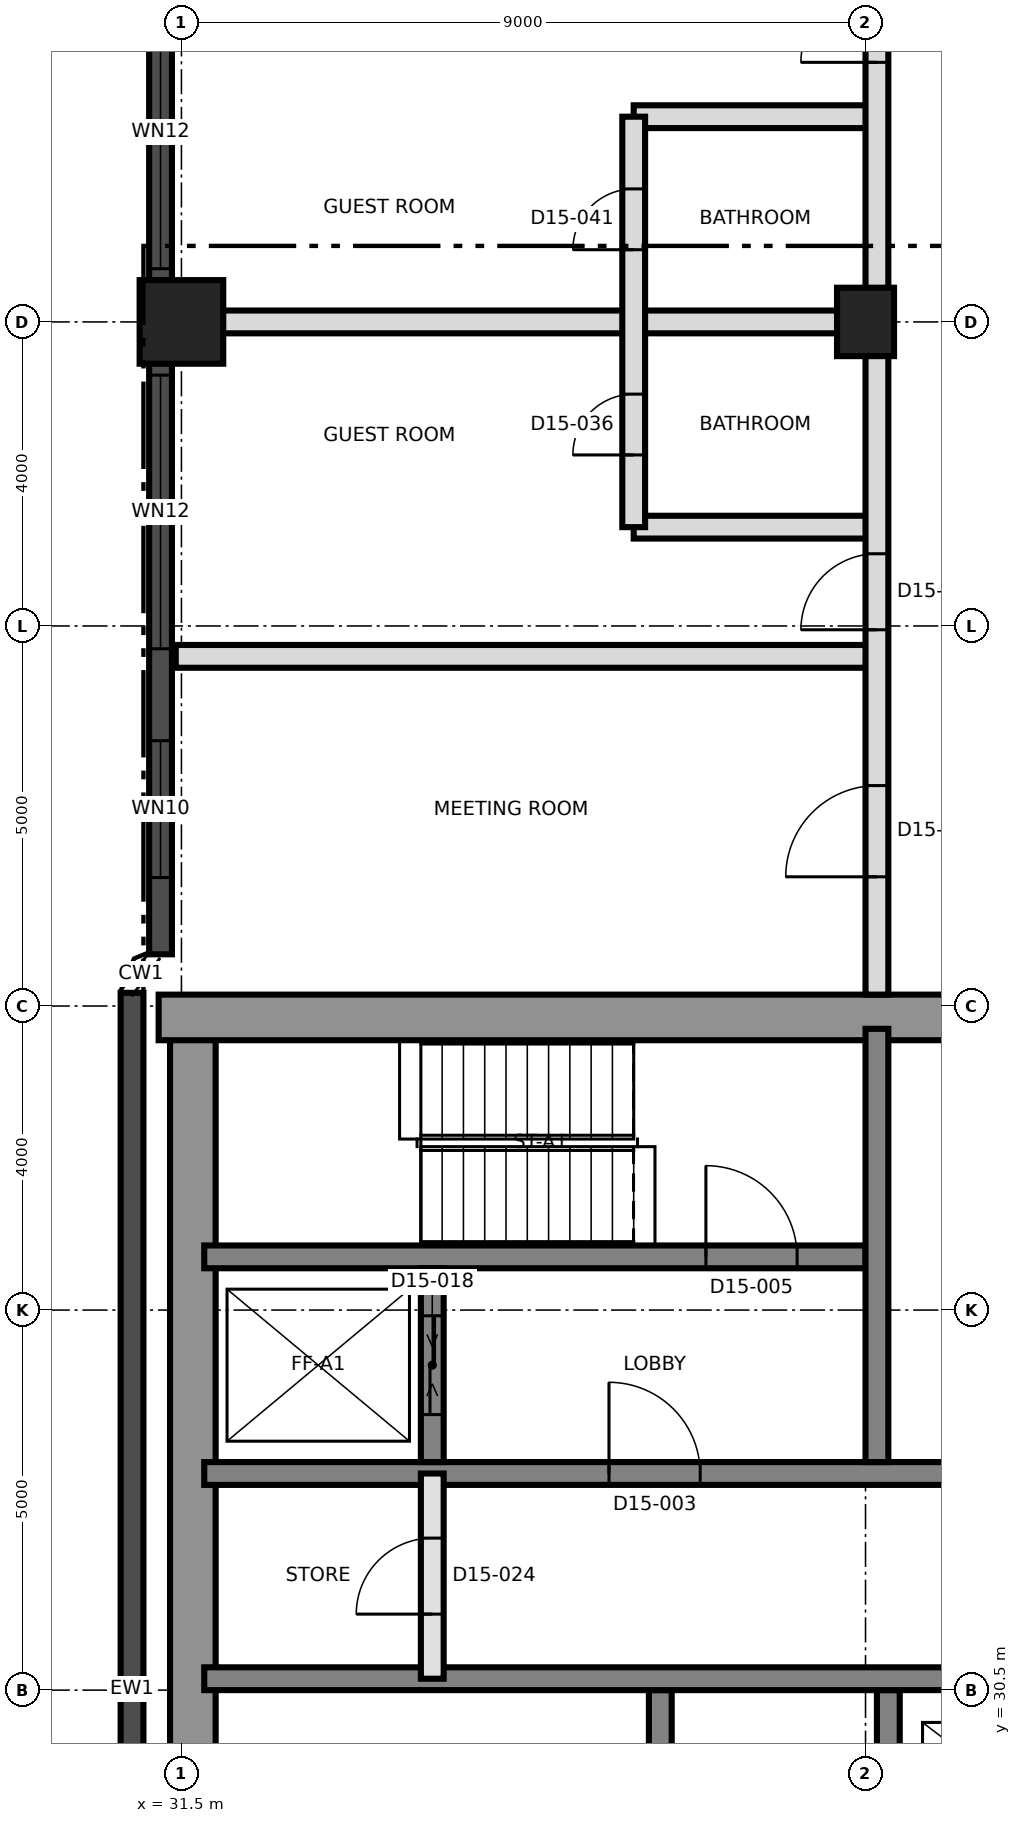
"""IFC4 building model, lengths in metres.
Left out: names, types, materials, properties, quantities, classifications, styles, units other than length and angle.
Written with IfcOpenShell. Run it as: python <this file> out.ifc"""

import sys

from ifc_helpers import new_model, si_unit, direction, frame, frame_2d, origin, origin_2d, place, context, subcontext, project, spatial, rectangle, extrude, element, fill, save


model = new_model("IFC4")
c1 = context("Model", 3, precision=1e-05, world=origin(), true_north=direction((0.0, 1.0)))
c2 = subcontext(c1, "Body", "Model", "MODEL_VIEW")
j1 = project(units=[si_unit("LENGTHUNIT", "METRE"), si_unit("PLANEANGLEUNIT", "RADIAN")], contexts=[c1])
p1 = place(None, origin())
s1 = spatial("IfcSite", under=j1, at=p1, CompositionType="ELEMENT")
p2 = place(p1, origin())
s2 = spatial("IfcBuilding", under=s1, at=p2, CompositionType="ELEMENT")
p3 = place(p2, frame((0.0, 0.0, 157.0)))
s3 = spatial("IfcBuildingStorey", under=s2, at=p3, CompositionType="ELEMENT", Elevation=157.0)
p4 = place(p3, frame((31.65, 21.8, 0.0), z_axis=(0.0, 0.0, 1.0), x_axis=(0.0, 1.0, 0.0)))
e1 = element("IfcWall", 1, at=p4, inside=s3, PredefinedType="SHEAR", context=c2, shape_type="SweptSolid", body=[
    extrude(rectangle(XDim=17.4, YDim=0.6, at=frame_2d((8.7, 0.0))), origin(), (0.0, 0.0, 1.0), 3.7),
])
p5 = place(p3, frame((31.2, 39.35, 0.0), z_axis=(0.0, 0.0, 1.0), x_axis=(1.0, 0.0, 0.0)))
e2 = element("IfcWall", 2, at=p5, inside=s3, PredefinedType="SHEAR", context=c2, shape_type="SweptSolid", body=[
    extrude(rectangle(XDim=27.0, YDim=0.6, at=frame_2d((13.5, 0.0))), origin(), (0.0, 0.0, 1.0), 3.7),
])
p6 = place(p5, frame((10.5, 0.0, 0.0)))
e3 = element("IfcOpeningElement", 3, at=p6, cuts=e2, PredefinedType="OPENING", context=c2, shape_type="SweptSolid", body=[
    extrude(rectangle(XDim=1.2, YDim=2.1, at=frame_2d((0.6, 1.05))), frame((0.0, 0.31, 0.0), z_axis=(0.0, -1.0, 0.0), x_axis=(1.0, 0.0, 0.0)), (0.0, 0.0, 1.0), 0.62),
])
p7 = place(p3, frame((37.8, 21.8, 0.0), z_axis=(0.0, 0.0, 1.0), x_axis=(0.0, 1.0, 0.0)))
e4 = element("IfcWall", 4, at=p7, inside=s3, PredefinedType="SHEAR", context=c2, shape_type="SweptSolid", body=[
    extrude(rectangle(XDim=8.7, YDim=0.3, at=frame_2d((4.35, 0.0))), origin(), (0.0, 0.0, 1.0), 3.7),
])
p8 = place(p7, frame((5.475, 0.0, 0.0)))
e5 = element("IfcOpeningElement", 5, at=p8, cuts=e4, PredefinedType="OPENING", context=c2, shape_type="SweptSolid", body=[
    extrude(rectangle(XDim=1.0, YDim=2.1, at=frame_2d((0.5, 1.05))), frame((0.0, 0.16, 0.0), z_axis=(0.0, -1.0, 0.0), x_axis=(1.0, 0.0, 0.0)), (0.0, 0.0, 1.0), 0.32),
])
p9 = place(p3, frame((40.8, 21.8, 0.0), z_axis=(0.0, 0.0, 1.0), x_axis=(0.0, 1.0, 0.0)))
e6 = element("IfcWall", 6, at=p9, inside=s3, PredefinedType="SHEAR", context=c2, shape_type="SweptSolid", body=[
    extrude(rectangle(XDim=8.7, YDim=0.3, at=frame_2d((4.35, 0.0))), origin(), (0.0, 0.0, 1.0), 3.7),
])
p10 = place(p9, frame((3.85, 0.0, 0.0)))
e7 = element("IfcOpeningElement", 7, at=p10, cuts=e6, PredefinedType="OPENING", context=c2, shape_type="SweptSolid", body=[
    extrude(rectangle(XDim=1.5, YDim=2.1, at=frame_2d((0.75, 1.05))), frame((0.0, 0.16, 0.0), z_axis=(0.0, -1.0, 0.0), x_axis=(1.0, 0.0, 0.0)), (0.0, 0.0, 1.0), 0.32),
])
p11 = place(p3, frame((31.8, 30.65, 0.0), z_axis=(0.0, 0.0, 1.0), x_axis=(1.0, 0.0, 0.0)))
e8 = element("IfcWall", 8, at=p11, inside=s3, PredefinedType="SHEAR", context=c2, shape_type="SweptSolid", body=[
    extrude(rectangle(XDim=26.4, YDim=0.3, at=frame_2d((13.2, 0.0))), origin(), (0.0, 0.0, 1.0), 3.7),
])
p12 = place(p11, frame((24.7, 0.0, 0.0)))
e9 = element("IfcOpeningElement", 9, at=p12, cuts=e8, PredefinedType="OPENING", context=c2, shape_type="SweptSolid", body=[
    extrude(rectangle(XDim=1.0, YDim=2.1, at=frame_2d((0.5, 1.05))), frame((0.0, 0.16, 0.0), z_axis=(0.0, -1.0, 0.0), x_axis=(1.0, 0.0, 0.0)), (0.0, 0.0, 1.0), 0.32),
])
p13 = place(p3, frame((31.8, 33.35, 0.0), z_axis=(0.0, 0.0, 1.0), x_axis=(1.0, 0.0, 0.0)))
e10 = element("IfcWall", 10, at=p13, inside=s3, PredefinedType="SHEAR", context=c2, shape_type="SweptSolid", body=[
    extrude(rectangle(XDim=26.4, YDim=0.3, at=frame_2d((13.2, 0.0))), origin(), (0.0, 0.0, 1.0), 3.7),
])
p14 = place(p13, frame((13.85, 0.0, 0.0)))
e11 = element("IfcOpeningElement", 11, at=p14, cuts=e10, PredefinedType="OPENING", context=c2, shape_type="SweptSolid", body=[
    extrude(rectangle(XDim=1.4, YDim=2.1, at=frame_2d((0.7, 1.05))), frame((0.0, 0.16, 0.0), z_axis=(0.0, -1.0, 0.0), x_axis=(1.0, 0.0, 0.0)), (0.0, 0.0, 1.0), 0.32),
])
p15 = place(p13, frame((5.325, 0.0, 0.0)))
e12 = element("IfcOpeningElement", 12, at=p15, cuts=e10, PredefinedType="OPENING", context=c2, shape_type="SweptSolid", body=[
    extrude(rectangle(XDim=1.2, YDim=2.1, at=frame_2d((0.6, 1.05))), frame((0.0, 0.16, 0.0), z_axis=(0.0, -1.0, 0.0), x_axis=(1.0, 0.0, 0.0)), (0.0, 0.0, 1.0), 0.32),
])
p16 = place(p13, frame((19.875, 0.0, 0.0)))
e13 = element("IfcOpeningElement", 13, at=p16, cuts=e10, PredefinedType="OPENING", context=c2, shape_type="SweptSolid", body=[
    extrude(rectangle(XDim=1.2, YDim=2.1, at=frame_2d((0.6, 1.05))), frame((0.0, 0.16, 0.0), z_axis=(0.0, -1.0, 0.0), x_axis=(1.0, 0.0, 0.0)), (0.0, 0.0, 1.0), 0.32),
])
p17 = place(p3, frame((31.8, 36.2, 0.0), z_axis=(0.0, 0.0, 1.0), x_axis=(1.0, 0.0, 0.0)))
e14 = element("IfcWall", 14, at=p17, inside=s3, PredefinedType="SHEAR", context=c2, shape_type="SweptSolid", body=[
    extrude(rectangle(XDim=8.7, YDim=0.3, at=frame_2d((4.35, 0.0))), origin(), (0.0, 0.0, 1.0), 3.7),
])
p18 = place(p17, frame((6.6, 0.0, 0.0)))
e15 = element("IfcOpeningElement", 15, at=p18, cuts=e14, PredefinedType="OPENING", context=c2, shape_type="SweptSolid", body=[
    extrude(rectangle(XDim=1.2, YDim=2.1, at=frame_2d((0.6, 1.05))), frame((0.0, 0.16, 0.0), z_axis=(0.0, -1.0, 0.0), x_axis=(1.0, 0.0, 0.0)), (0.0, 0.0, 1.0), 0.32),
])
p19 = place(p3, frame((40.65, 33.5, 0.0), z_axis=(0.0, 0.0, 1.0), x_axis=(0.0, 1.0, 0.0)))
e16 = element("IfcWall", 16, at=p19, inside=s3, PredefinedType="SHEAR", context=c2, shape_type="SweptSolid", body=[
    extrude(rectangle(XDim=5.7, YDim=0.3, at=frame_2d((2.85, 0.0))), origin(), (0.0, 0.0, 1.0), 3.7),
])
p20 = place(p3, frame((34.8, 33.5, 0.0), z_axis=(0.0, 0.0, 1.0), x_axis=(0.0, 1.0, 0.0)))
e17 = element("IfcWall", 17, at=p20, inside=s3, PredefinedType="SHEAR", context=c2, shape_type="SweptSolid", body=[
    extrude(rectangle(XDim=2.55, YDim=0.3, at=frame_2d((1.275, 0.0))), origin(), (0.0, 0.0, 1.0), 3.7),
])
p21 = place(p20, frame((0.625, 0.0, 0.0)))
e18 = element("IfcOpeningElement", 18, at=p21, cuts=e17, PredefinedType="OPENING", context=c2, shape_type="SweptSolid", body=[
    extrude(rectangle(XDim=1.3, YDim=2.4, at=frame_2d((0.65, 1.2))), frame((0.0, 0.16, 0.0), z_axis=(0.0, -1.0, 0.0), x_axis=(1.0, 0.0, 0.0)), (0.0, 0.0, 1.0), 0.32),
])
p22 = place(p3, frame((31.5, 48.5, 0.0), z_axis=(0.0, 0.0, 1.0), x_axis=(1.0, 0.0, 0.0)))
e19 = element("IfcColumn", 19, at=p22, inside=s3, PredefinedType="COLUMN", context=c2, shape_type="SweptSolid", body=[
    extrude(rectangle(XDim=1.1, YDim=1.1, at=origin_2d()), origin(), (0.0, 0.0, 1.0), 3.7),
])
p23 = place(p3, frame((40.5, 48.5, 0.0), z_axis=(0.0, 0.0, 1.0), x_axis=(0.0, 1.0, 0.0)))
e20 = element("IfcColumn", 20, at=p23, inside=s3, PredefinedType="COLUMN", context=c2, shape_type="SweptSolid", body=[
    extrude(rectangle(XDim=0.9, YDim=0.75, at=origin_2d()), origin(), (0.0, 0.0, 1.0), 3.7),
])
p24 = place(p3, frame((31.225, 56.95, 0.0), z_axis=(0.0, 0.0, 1.0), x_axis=(0.0, -1.0, 0.0)))
e21 = element("IfcWall", 21, at=p24, inside=s3, PredefinedType="SOLIDWALL", context=c2, shape_type="SweptSolid", body=[
    extrude(rectangle(XDim=7.9, YDim=0.3, at=frame_2d((3.95, 0.0))), origin(), (0.0, 0.0, 1.0), 2.8),
])
p25 = place(p24, frame((0.15, 0.0, 0.9)))
e22 = element("IfcOpeningElement", 22, at=p25, cuts=e21, PredefinedType="OPENING", context=c2, shape_type="SweptSolid", body=[
    extrude(rectangle(XDim=3.6, YDim=1.5, at=frame_2d((1.8, 0.75))), frame((0.0, 0.16, 0.0), z_axis=(0.0, -1.0, 0.0), x_axis=(1.0, 0.0, 0.0)), (0.0, 0.0, 1.0), 0.32),
])
p26 = place(p24, frame((4.15, 0.0, 0.9)))
e23 = element("IfcOpeningElement", 23, at=p26, cuts=e21, PredefinedType="OPENING", context=c2, shape_type="SweptSolid", body=[
    extrude(rectangle(XDim=3.6, YDim=1.5, at=frame_2d((1.8, 0.75))), frame((0.0, 0.16, 0.0), z_axis=(0.0, -1.0, 0.0), x_axis=(1.0, 0.0, 0.0)), (0.0, 0.0, 1.0), 0.32),
])
p27 = place(p3, frame((31.225, 49.05, 0.0), z_axis=(0.0, 0.0, 1.0), x_axis=(0.0, -1.0, 0.0)))
e24 = element("IfcWall", 24, at=p27, inside=s3, PredefinedType="SOLIDWALL", context=c2, shape_type="SweptSolid", body=[
    extrude(rectangle(XDim=8.87, YDim=0.3, at=frame_2d((4.435, 0.0))), origin(), (0.0, 0.0, 1.0), 3.4),
])
p28 = place(p27, frame((1.25, 0.0, 0.9)))
e25 = element("IfcOpeningElement", 25, at=p28, cuts=e24, PredefinedType="OPENING", context=c2, shape_type="SweptSolid", body=[
    extrude(rectangle(XDim=3.6, YDim=1.5, at=frame_2d((1.8, 0.75))), frame((0.0, 0.16, 0.0), z_axis=(0.0, -1.0, 0.0), x_axis=(1.0, 0.0, 0.0)), (0.0, 0.0, 1.0), 0.32),
])
p29 = place(p27, frame((6.06, 0.0, 0.3)))
e26 = element("IfcOpeningElement", 26, at=p29, cuts=e24, PredefinedType="OPENING", context=c2, shape_type="SweptSolid", body=[
    extrude(rectangle(XDim=1.8, YDim=2.4, at=frame_2d((0.9, 1.2))), frame((0.0, 0.16, 0.0), z_axis=(0.0, -1.0, 0.0), x_axis=(1.0, 0.0, 0.0)), (0.0, 0.0, 1.0), 0.32),
])
p30 = place(p3, frame((30.85, 39.674, 0.0), z_axis=(0.0, 0.0, 1.0), x_axis=(0.0, -1.0, 0.0)))
e27 = element("IfcWall", 27, at=p30, inside=s3, PredefinedType="SOLIDWALL", context=c2, shape_type="SweptSolid", body=[
    extrude(rectangle(XDim=18.314, YDim=0.3, at=frame_2d((9.157, 0.0))), origin(), (0.0, 0.0, 1.0), 3.4),
])
p31 = place(p3, frame((34.8, 30.65, 0.0), z_axis=(0.0, 0.0, 1.0), x_axis=(0.0, 1.0, 0.0)))
e28 = element("IfcWall", 28, at=p31, inside=s3, PredefinedType="SOLIDWALL", context=c2, shape_type="SweptSolid", body=[
    extrude(rectangle(XDim=2.7, YDim=0.3, at=frame_2d((1.35, 0.0))), origin(), (0.0, 0.0, 1.0), 3.4),
])
p32 = place(p31, frame((0.85, 0.0, 0.0)))
e29 = element("IfcOpeningElement", 29, at=p32, cuts=e28, PredefinedType="OPENING", context=c2, shape_type="SweptSolid", body=[
    extrude(rectangle(XDim=1.0, YDim=2.1, at=frame_2d((0.5, 1.05))), frame((0.0, 0.16, 0.0), z_axis=(0.0, -1.0, 0.0), x_axis=(1.0, 0.0, 0.0)), (0.0, 0.0, 1.0), 0.32),
])
p33 = place(p3, frame((31.425, 44.1, 0.0), z_axis=(0.0, 0.0, 1.0), x_axis=(1.0, 0.0, 0.0)))
e30 = element("IfcWall", 30, at=p33, inside=s3, PredefinedType="PARTITIONING", context=c2, shape_type="SweptSolid", body=[
    extrude(rectangle(XDim=9.225, YDim=0.3, at=frame_2d((4.612, 0.0))), origin(), (0.0, 0.0, 1.0), 3.4),
])
p34 = place(p3, frame((37.45, 45.8, 0.0), z_axis=(0.0, 0.0, 1.0), x_axis=(1.0, 0.0, 0.0)))
e31 = element("IfcWall", 31, at=p34, inside=s3, PredefinedType="PARTITIONING", context=c2, shape_type="SweptSolid", body=[
    extrude(rectangle(XDim=3.2, YDim=0.3, at=frame_2d((1.6, 0.0))), origin(), (0.0, 0.0, 1.0), 3.4),
])
p35 = place(p3, frame((31.425, 48.5, 0.0), z_axis=(0.0, 0.0, 1.0), x_axis=(1.0, 0.0, 0.0)))
e32 = element("IfcWall", 32, at=p35, inside=s3, PredefinedType="PARTITIONING", context=c2, shape_type="SweptSolid", body=[
    extrude(rectangle(XDim=9.225, YDim=0.3, at=frame_2d((4.612, 0.0))), origin(), (0.0, 0.0, 1.0), 3.4),
])
p36 = place(p3, frame((37.45, 51.2, 0.0), z_axis=(0.0, 0.0, 1.0), x_axis=(1.0, 0.0, 0.0)))
e33 = element("IfcWall", 33, at=p36, inside=s3, PredefinedType="PARTITIONING", context=c2, shape_type="SweptSolid", body=[
    extrude(rectangle(XDim=3.2, YDim=0.3, at=frame_2d((1.6, 0.0))), origin(), (0.0, 0.0, 1.0), 3.4),
])
p37 = place(p3, frame((37.45, 45.8, 0.0), z_axis=(0.0, 0.0, 1.0), x_axis=(0.0, 1.0, 0.0)))
e34 = element("IfcWall", 34, at=p37, inside=s3, PredefinedType="PARTITIONING", context=c2, shape_type="SweptSolid", body=[
    extrude(rectangle(XDim=5.4, YDim=0.3, at=frame_2d((2.7, 0.0))), origin(), (0.0, 0.0, 1.0), 3.4),
])
p38 = place(p37, frame((0.95, 0.0, 0.0)))
e35 = element("IfcOpeningElement", 35, at=p38, cuts=e34, PredefinedType="OPENING", context=c2, shape_type="SweptSolid", body=[
    extrude(rectangle(XDim=0.8, YDim=2.1, at=frame_2d((0.4, 1.05))), frame((0.0, 0.16, 0.0), z_axis=(0.0, -1.0, 0.0), x_axis=(1.0, 0.0, 0.0)), (0.0, 0.0, 1.0), 0.32),
])
p39 = place(p37, frame((3.65, 0.0, 0.0)))
e36 = element("IfcOpeningElement", 36, at=p39, cuts=e34, PredefinedType="OPENING", context=c2, shape_type="SweptSolid", body=[
    extrude(rectangle(XDim=0.8, YDim=2.1, at=frame_2d((0.4, 1.05))), frame((0.0, 0.16, 0.0), z_axis=(0.0, -1.0, 0.0), x_axis=(1.0, 0.0, 0.0)), (0.0, 0.0, 1.0), 0.32),
])
p40 = place(p3, frame((40.65, 39.65, 0.0), z_axis=(0.0, 0.0, 1.0), x_axis=(0.0, 1.0, 0.0)))
e37 = element("IfcWall", 37, at=p40, inside=s3, PredefinedType="PARTITIONING", context=c2, shape_type="SweptSolid", body=[
    extrude(rectangle(XDim=35.925, YDim=0.3, at=frame_2d((17.962, 0.0))), origin(), (0.0, 0.0, 1.0), 3.4),
])
p41 = place(p40, frame((1.55, 0.0, 0.0)))
e38 = element("IfcOpeningElement", 38, at=p41, cuts=e37, PredefinedType="OPENING", context=c2, shape_type="SweptSolid", body=[
    extrude(rectangle(XDim=1.2, YDim=2.1, at=frame_2d((0.6, 1.05))), frame((0.0, 0.16, 0.0), z_axis=(0.0, -1.0, 0.0), x_axis=(1.0, 0.0, 0.0)), (0.0, 0.0, 1.0), 0.32),
])
p42 = place(p40, frame((4.8, 0.0, 0.0)))
e39 = element("IfcOpeningElement", 39, at=p42, cuts=e37, PredefinedType="OPENING", context=c2, shape_type="SweptSolid", body=[
    extrude(rectangle(XDim=1.0, YDim=2.1, at=frame_2d((0.5, 1.05))), frame((0.0, 0.16, 0.0), z_axis=(0.0, -1.0, 0.0), x_axis=(1.0, 0.0, 0.0)), (0.0, 0.0, 1.0), 0.32),
])
p43 = place(p40, frame((12.265, 0.0, 0.0)))
e40 = element("IfcOpeningElement", 40, at=p43, cuts=e37, PredefinedType="OPENING", context=c2, shape_type="SweptSolid", body=[
    extrude(rectangle(XDim=1.0, YDim=2.1, at=frame_2d((0.5, 1.05))), frame((0.0, 0.16, 0.0), z_axis=(0.0, -1.0, 0.0), x_axis=(1.0, 0.0, 0.0)), (0.0, 0.0, 1.0), 0.32),
])
p44 = place(p40, frame((15.215, 0.0, 0.0)))
e41 = element("IfcOpeningElement", 41, at=p44, cuts=e37, PredefinedType="OPENING", context=c2, shape_type="SweptSolid", body=[
    extrude(rectangle(XDim=1.4, YDim=2.1, at=frame_2d((0.7, 1.05))), frame((0.0, 0.16, 0.0), z_axis=(0.0, -1.0, 0.0), x_axis=(1.0, 0.0, 0.0)), (0.0, 0.0, 1.0), 0.32),
])
p45 = place(p40, frame((21.35, 0.0, 0.0)))
e42 = element("IfcOpeningElement", 42, at=p45, cuts=e37, PredefinedType="OPENING", context=c2, shape_type="SweptSolid", body=[
    extrude(rectangle(XDim=1.0, YDim=2.4, at=frame_2d((0.5, 1.2))), frame((0.0, 0.16, 0.0), z_axis=(0.0, -1.0, 0.0), x_axis=(1.0, 0.0, 0.0)), (0.0, 0.0, 1.0), 0.32),
])
p46 = place(p26, origin())
e43 = element("IfcWindow", 43, at=p46, inside=s3, PartitioningType="SINGLE_PANEL", PredefinedType="WINDOW", context=c2, shape_type="SweptSolid", body=[
    extrude(rectangle(XDim=3.6, YDim=1.5, at=frame_2d((1.8, 0.75))), frame((0.0, 0.03, 0.0), z_axis=(0.0, -1.0, 0.0), x_axis=(1.0, 0.0, 0.0)), (0.0, 0.0, 1.0), 0.06),
])
fill(e23, e43)
p47 = place(p28, origin())
e44 = element("IfcWindow", 44, at=p47, inside=s3, PartitioningType="SINGLE_PANEL", PredefinedType="WINDOW", context=c2, shape_type="SweptSolid", body=[
    extrude(rectangle(XDim=3.6, YDim=1.5, at=frame_2d((1.8, 0.75))), frame((0.0, 0.03, 0.0), z_axis=(0.0, -1.0, 0.0), x_axis=(1.0, 0.0, 0.0)), (0.0, 0.0, 1.0), 0.06),
])
fill(e25, e44)
p48 = place(p29, origin())
e45 = element("IfcWindow", 45, at=p48, inside=s3, PartitioningType="SINGLE_PANEL", PredefinedType="WINDOW", context=c2, shape_type="SweptSolid", body=[
    extrude(rectangle(XDim=1.8, YDim=2.4, at=frame_2d((0.9, 1.2))), frame((0.0, 0.03, 0.0), z_axis=(0.0, -1.0, 0.0), x_axis=(1.0, 0.0, 0.0)), (0.0, 0.0, 1.0), 0.06),
])
fill(e26, e45)
p49 = place(p15, origin())
e46 = element("IfcDoor", 46, at=p49, inside=s3, OperationType="SINGLE_SWING_LEFT", PredefinedType="DOOR", context=c2, shape_type="SweptSolid", body=[
    extrude(rectangle(XDim=1.2, YDim=2.1, at=frame_2d((0.6, 1.05))), frame((0.0, 0.025, 0.0), z_axis=(0.0, -1.0, 0.0), x_axis=(1.0, 0.0, 0.0)), (0.0, 0.0, 1.0), 0.05),
])
fill(e12, e46)
p50 = place(p18, origin())
e47 = element("IfcDoor", 47, at=p50, inside=s3, OperationType="SINGLE_SWING_RIGHT", PredefinedType="DOOR", context=c2, shape_type="SweptSolid", body=[
    extrude(rectangle(XDim=1.2, YDim=2.1, at=frame_2d((0.6, 1.05))), frame((0.0, 0.025, 0.0), z_axis=(0.0, -1.0, 0.0), x_axis=(1.0, 0.0, 0.0)), (0.0, 0.0, 1.0), 0.05),
])
fill(e15, e47)
p51 = place(p21, origin())
e48 = element("IfcDoor", 48, at=p51, inside=s3, OperationType="SLIDING_TO_LEFT", PredefinedType="DOOR", context=c2, shape_type="SweptSolid", body=[
    extrude(rectangle(XDim=1.3, YDim=2.4, at=frame_2d((0.65, 1.2))), frame((0.0, 0.025, 0.0), z_axis=(0.0, -1.0, 0.0), x_axis=(1.0, 0.0, 0.0)), (0.0, 0.0, 1.0), 0.05),
])
fill(e18, e48)
p52 = place(p32, origin())
e49 = element("IfcDoor", 49, at=p52, inside=s3, OperationType="SINGLE_SWING_LEFT", PredefinedType="DOOR", context=c2, shape_type="SweptSolid", body=[
    extrude(rectangle(XDim=1.0, YDim=2.1, at=frame_2d((0.5, 1.05))), frame((0.0, 0.025, 0.0), z_axis=(0.0, -1.0, 0.0), x_axis=(1.0, 0.0, 0.0)), (0.0, 0.0, 1.0), 0.05),
])
fill(e29, e49)
p53 = place(p41, origin())
e50 = element("IfcDoor", 50, at=p53, inside=s3, OperationType="SINGLE_SWING_LEFT", PredefinedType="DOOR", context=c2, shape_type="SweptSolid", body=[
    extrude(rectangle(XDim=1.2, YDim=2.1, at=frame_2d((0.6, 1.05))), frame((0.0, 0.025, 0.0), z_axis=(0.0, -1.0, 0.0), x_axis=(1.0, 0.0, 0.0)), (0.0, 0.0, 1.0), 0.05),
])
fill(e38, e50)
p54 = place(p38, origin())
e51 = element("IfcDoor", 51, at=p54, inside=s3, OperationType="SINGLE_SWING_RIGHT", PredefinedType="DOOR", context=c2, shape_type="SweptSolid", body=[
    extrude(rectangle(XDim=0.8, YDim=2.1, at=frame_2d((0.4, 1.05))), frame((0.0, 0.025, 0.0), z_axis=(0.0, -1.0, 0.0), x_axis=(1.0, 0.0, 0.0)), (0.0, 0.0, 1.0), 0.05),
])
fill(e35, e51)
p55 = place(p42, origin())
e52 = element("IfcDoor", 52, at=p55, inside=s3, OperationType="SINGLE_SWING_LEFT", PredefinedType="DOOR", context=c2, shape_type="SweptSolid", body=[
    extrude(rectangle(XDim=1.0, YDim=2.1, at=frame_2d((0.5, 1.05))), frame((0.0, 0.025, 0.0), z_axis=(0.0, -1.0, 0.0), x_axis=(1.0, 0.0, 0.0)), (0.0, 0.0, 1.0), 0.05),
])
fill(e39, e52)
p56 = place(p39, origin())
e53 = element("IfcDoor", 53, at=p56, inside=s3, OperationType="SINGLE_SWING_LEFT", PredefinedType="DOOR", context=c2, shape_type="SweptSolid", body=[
    extrude(rectangle(XDim=0.8, YDim=2.1, at=frame_2d((0.4, 1.05))), frame((0.0, 0.025, 0.0), z_axis=(0.0, -1.0, 0.0), x_axis=(1.0, 0.0, 0.0)), (0.0, 0.0, 1.0), 0.05),
])
fill(e36, e53)
p57 = place(p43, origin())
e54 = element("IfcDoor", 54, at=p57, inside=s3, OperationType="SINGLE_SWING_LEFT", PredefinedType="DOOR", context=c2, shape_type="SweptSolid", body=[
    extrude(rectangle(XDim=1.0, YDim=2.1, at=frame_2d((0.5, 1.05))), frame((0.0, 0.025, 0.0), z_axis=(0.0, -1.0, 0.0), x_axis=(1.0, 0.0, 0.0)), (0.0, 0.0, 1.0), 0.05),
])
fill(e40, e54)
save(model, sys.argv[1])
